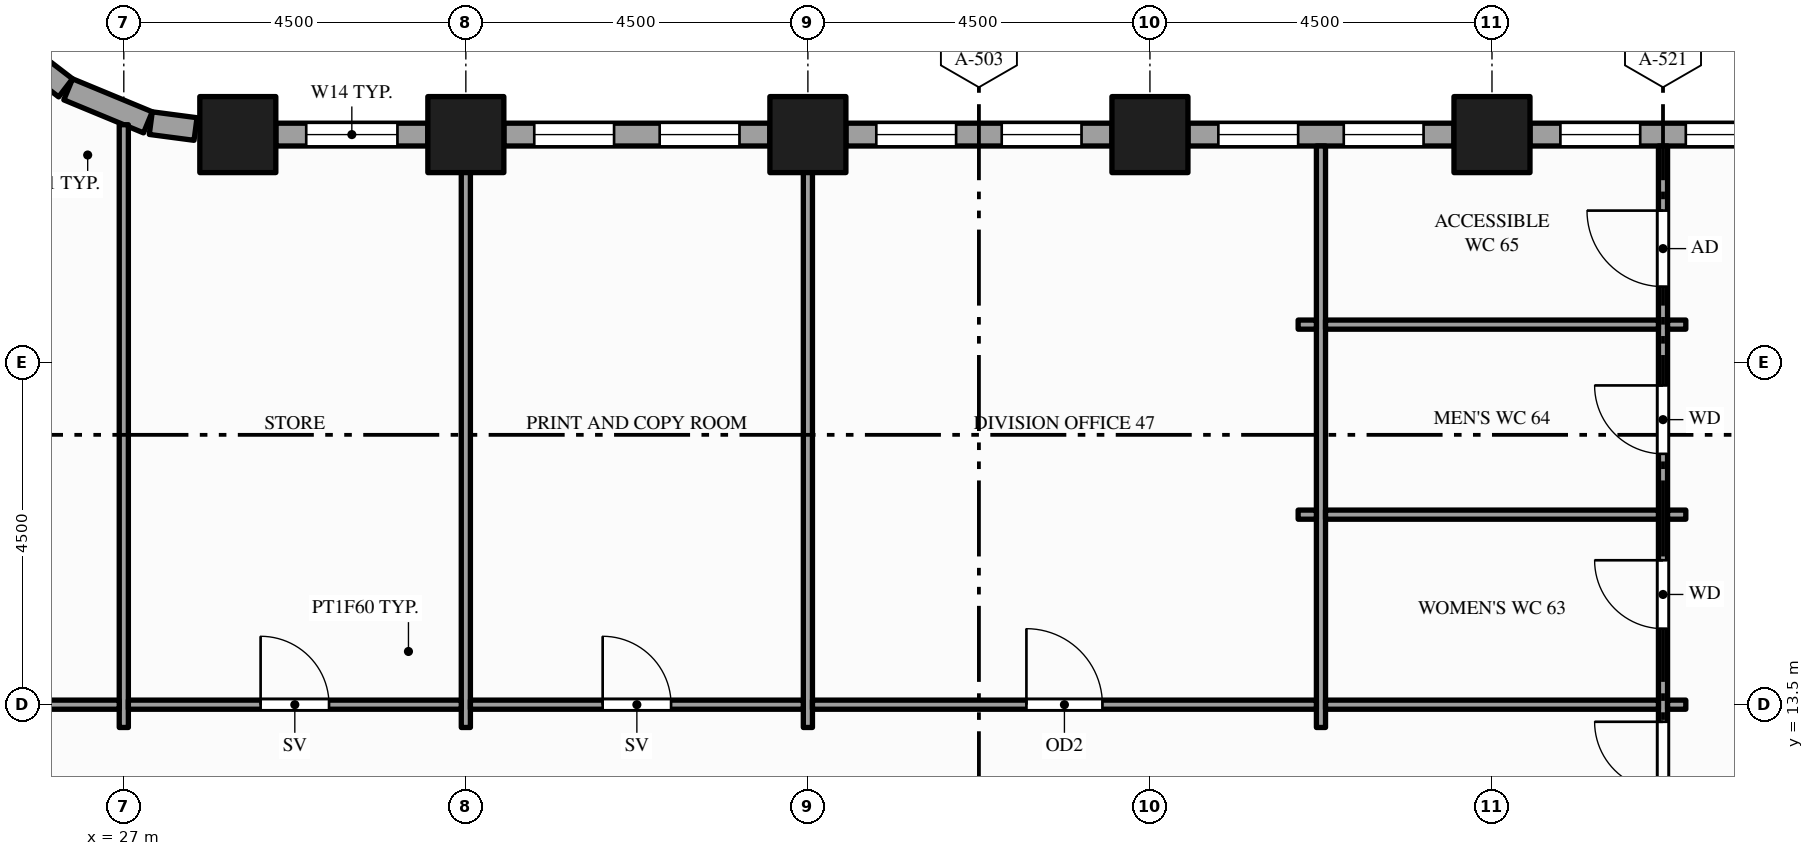
"""IFC4 building model, lengths in metres.
Left out: names, types, materials, properties, quantities, classifications, styles, units other than length and angle.
Written with IfcOpenShell. Run it as: python <this file> out.ifc"""

import sys

from ifc_helpers import new_model, si_unit, direction, frame, frame_2d, origin, origin_2d, place, context, subcontext, project, spatial, rectangle, hollow_rectangle, extrude, element, fill, save


model = new_model("IFC4")
c1 = context("Model", 3, precision=1e-05, world=origin(), true_north=direction((0.0, 1.0)))
c2 = subcontext(c1, "Body", "Model", "MODEL_VIEW")
j1 = project(units=[si_unit("LENGTHUNIT", "METRE"), si_unit("PLANEANGLEUNIT", "RADIAN")], contexts=[c1])
p1 = place(None, origin())
s1 = spatial("IfcSite", under=j1, at=p1, CompositionType="ELEMENT")
p2 = place(p1, origin())
s2 = spatial("IfcBuilding", under=s1, at=p2, CompositionType="ELEMENT")
p3 = place(p2, frame((0.0, 0.0, 123.0)))
s3 = spatial("IfcBuildingStorey", under=s2, at=p3, CompositionType="ELEMENT", Elevation=123.0)
for number, where, z_axis, x_axis in (
    (1, (28.5, 21.0, -0.15), (0.0, 0.0, 1.0), (1.0, 0.0, 0.0)),
    (2, (31.5, 21.0, -0.15), (0.0, 0.0, 1.0), (1.0, 0.0, 0.0)),
    (3, (36.0, 21.0, -0.15), (0.0, 0.0, 1.0), (1.0, 0.0, 0.0)),
    (4, (40.5, 21.0, -0.15), (0.0, 0.0, 1.0), (1.0, 0.0, 0.0)),
    (5, (45.0, 21.0, -0.15), (0.0, 0.0, 1.0), (1.0, 0.0, 0.0)),
):
    element("IfcColumn", number, at=place(p3, frame(where, z_axis=z_axis, x_axis=x_axis)), inside=s3, PredefinedType="COLUMN", context=c2, shape_type="SweptSolid", body=[
        extrude(hollow_rectangle(XDim=1.0, YDim=1.0, WallThickness=0.05, at=origin_2d()), origin(), (0.0, 0.0, 1.0), 4.0),
    ])
p4 = place(p3, frame((49.0, 21.0, 0.0), z_axis=(0.0, 0.0, 1.0), x_axis=(-1.0, 0.0, 0.0)))
e6 = element("IfcWall", 6, at=p4, inside=s3, PredefinedType="STANDARD", context=c2, shape_type="SweptSolid", body=[
    extrude(rectangle(XDim=3.5, YDim=0.3, at=frame_2d((1.75, 0.0))), origin(), (0.0, 0.0, 1.0), 3.154),
])
p5 = place(p4, frame((0.4, 0.0, 0.9)))
e7 = element("IfcOpeningElement", 7, at=p5, cuts=e6, PredefinedType="OPENING", context=c2, shape_type="SweptSolid", body=[
    extrude(rectangle(XDim=1.05, YDim=2.0, at=frame_2d((0.525, 1.0))), frame((0.0, 0.16, 0.0), z_axis=(0.0, -1.0, 0.0), x_axis=(1.0, 0.0, 0.0)), (0.0, 0.0, 1.0), 0.32),
])
p6 = place(p4, frame((2.05, 0.0, 0.9)))
e8 = element("IfcOpeningElement", 8, at=p6, cuts=e6, PredefinedType="OPENING", context=c2, shape_type="SweptSolid", body=[
    extrude(rectangle(XDim=1.05, YDim=2.0, at=frame_2d((0.525, 1.0))), frame((0.0, 0.16, 0.0), z_axis=(0.0, -1.0, 0.0), x_axis=(1.0, 0.0, 0.0)), (0.0, 0.0, 1.0), 0.32),
])
p7 = place(p3, frame((44.5, 21.0, 0.0), z_axis=(0.0, 0.0, 1.0), x_axis=(-1.0, 0.0, 0.0)))
e9 = element("IfcWall", 9, at=p7, inside=s3, PredefinedType="STANDARD", context=c2, shape_type="SweptSolid", body=[
    extrude(rectangle(XDim=3.5, YDim=0.3, at=frame_2d((1.75, 0.0))), origin(), (0.0, 0.0, 1.0), 3.154),
])
p8 = place(p7, frame((0.4, 0.0, 0.9)))
e10 = element("IfcOpeningElement", 10, at=p8, cuts=e9, PredefinedType="OPENING", context=c2, shape_type="SweptSolid", body=[
    extrude(rectangle(XDim=1.05, YDim=2.0, at=frame_2d((0.525, 1.0))), frame((0.0, 0.16, 0.0), z_axis=(0.0, -1.0, 0.0), x_axis=(1.0, 0.0, 0.0)), (0.0, 0.0, 1.0), 0.32),
])
p9 = place(p7, frame((2.05, 0.0, 0.9)))
e11 = element("IfcOpeningElement", 11, at=p9, cuts=e9, PredefinedType="OPENING", context=c2, shape_type="SweptSolid", body=[
    extrude(rectangle(XDim=1.05, YDim=2.0, at=frame_2d((0.525, 1.0))), frame((0.0, 0.16, 0.0), z_axis=(0.0, -1.0, 0.0), x_axis=(1.0, 0.0, 0.0)), (0.0, 0.0, 1.0), 0.32),
])
p10 = place(p3, frame((40.0, 21.0, 0.0), z_axis=(0.0, 0.0, 1.0), x_axis=(-1.0, 0.0, 0.0)))
e12 = element("IfcWall", 12, at=p10, inside=s3, PredefinedType="STANDARD", context=c2, shape_type="SweptSolid", body=[
    extrude(rectangle(XDim=3.5, YDim=0.3, at=frame_2d((1.75, 0.0))), origin(), (0.0, 0.0, 1.0), 3.154),
])
p11 = place(p10, frame((0.4, 0.0, 0.9)))
e13 = element("IfcOpeningElement", 13, at=p11, cuts=e12, PredefinedType="OPENING", context=c2, shape_type="SweptSolid", body=[
    extrude(rectangle(XDim=1.05, YDim=2.0, at=frame_2d((0.525, 1.0))), frame((0.0, 0.16, 0.0), z_axis=(0.0, -1.0, 0.0), x_axis=(1.0, 0.0, 0.0)), (0.0, 0.0, 1.0), 0.32),
])
p12 = place(p10, frame((2.05, 0.0, 0.9)))
e14 = element("IfcOpeningElement", 14, at=p12, cuts=e12, PredefinedType="OPENING", context=c2, shape_type="SweptSolid", body=[
    extrude(rectangle(XDim=1.05, YDim=2.0, at=frame_2d((0.525, 1.0))), frame((0.0, 0.16, 0.0), z_axis=(0.0, -1.0, 0.0), x_axis=(1.0, 0.0, 0.0)), (0.0, 0.0, 1.0), 0.32),
])
p13 = place(p3, frame((35.5, 21.0, 0.0), z_axis=(0.0, 0.0, 1.0), x_axis=(-1.0, 0.0, 0.0)))
e15 = element("IfcWall", 15, at=p13, inside=s3, PredefinedType="STANDARD", context=c2, shape_type="SweptSolid", body=[
    extrude(rectangle(XDim=3.5, YDim=0.3, at=frame_2d((1.75, 0.0))), origin(), (0.0, 0.0, 1.0), 3.154),
])
p14 = place(p13, frame((0.4, 0.0, 0.9)))
e16 = element("IfcOpeningElement", 16, at=p14, cuts=e15, PredefinedType="OPENING", context=c2, shape_type="SweptSolid", body=[
    extrude(rectangle(XDim=1.05, YDim=2.0, at=frame_2d((0.525, 1.0))), frame((0.0, 0.16, 0.0), z_axis=(0.0, -1.0, 0.0), x_axis=(1.0, 0.0, 0.0)), (0.0, 0.0, 1.0), 0.32),
])
p15 = place(p13, frame((2.05, 0.0, 0.9)))
e17 = element("IfcOpeningElement", 17, at=p15, cuts=e15, PredefinedType="OPENING", context=c2, shape_type="SweptSolid", body=[
    extrude(rectangle(XDim=1.05, YDim=2.0, at=frame_2d((0.525, 1.0))), frame((0.0, 0.16, 0.0), z_axis=(0.0, -1.0, 0.0), x_axis=(1.0, 0.0, 0.0)), (0.0, 0.0, 1.0), 0.32),
])
p16 = place(p3, frame((31.0, 21.0, 0.0), z_axis=(0.0, 0.0, 1.0), x_axis=(-1.0, 0.0, 0.0)))
e18 = element("IfcWall", 18, at=p16, inside=s3, PredefinedType="STANDARD", context=c2, shape_type="SweptSolid", body=[
    extrude(rectangle(XDim=2.0, YDim=0.3, at=frame_2d((1.0, 0.0))), origin(), (0.0, 0.0, 1.0), 3.154),
])
p17 = place(p16, frame((0.4, 0.0, 0.9)))
e19 = element("IfcOpeningElement", 19, at=p17, cuts=e18, PredefinedType="OPENING", context=c2, shape_type="SweptSolid", body=[
    extrude(rectangle(XDim=1.2, YDim=2.0, at=frame_2d((0.6, 1.0))), frame((0.0, 0.16, 0.0), z_axis=(0.0, -1.0, 0.0), x_axis=(1.0, 0.0, 0.0)), (0.0, 0.0, 1.0), 0.32),
])
p18 = place(p3, frame((27.944, 21.073, 0.0), z_axis=(0.0, 0.0, 1.0), x_axis=(-0.991420685839, 0.130709692412, 0.0)))
e20 = element("IfcWall", 20, at=p18, inside=s3, PredefinedType="STANDARD", context=c2, shape_type="SweptSolid", body=[
    extrude(rectangle(XDim=0.594, YDim=0.3, at=frame_2d((0.297, 0.0))), origin(), (0.0, 0.0, 1.0), 3.154),
])
p19 = place(p3, frame((27.317, 21.161, 0.0), z_axis=(0.0, 0.0, 1.0), x_axis=(-0.923914616768, 0.382598720491, 0.0)))
e21 = element("IfcWall", 21, at=p19, inside=s3, PredefinedType="STANDARD", context=c2, shape_type="SweptSolid", body=[
    extrude(rectangle(XDim=1.135, YDim=0.3, at=frame_2d((0.568, 0.0))), origin(), (0.0, 0.0, 1.0), 2.938),
])
p20 = place(p3, frame((26.234, 21.615, 0.0), z_axis=(0.0, 0.0, 1.0), x_axis=(-0.793563062559, 0.608488016104, 0.0)))
e22 = element("IfcWall", 22, at=p20, inside=s3, PredefinedType="STANDARD", context=c2, shape_type="SweptSolid", body=[
    extrude(rectangle(XDim=0.454, YDim=0.3, at=frame_2d((0.227, 0.0))), origin(), (0.0, 0.0, 1.0), 3.154),
])
p21 = place(p3, frame((27.0, 13.2, 0.0), z_axis=(0.0, 0.0, 1.0), x_axis=(0.0, 1.0, 0.0)))
e23 = element("IfcWall", 23, at=p21, inside=s3, PredefinedType="PARTITIONING", context=c2, shape_type="SweptSolid", body=[
    extrude(rectangle(XDim=7.93, YDim=0.12, at=frame_2d((3.965, 0.0))), origin(), (0.0, 0.0, 1.0), 2.938),
])
for number, where, z_axis, x_axis in (
    (24, (31.5, 13.2, 0.0), (0.0, 0.0, 1.0), (0.0, 1.0, 0.0)),
    (25, (36.0, 13.2, 0.0), (0.0, 0.0, 1.0), (0.0, 1.0, 0.0)),
    (26, (42.75, 13.2, 0.0), (0.0, 0.0, 1.0), (0.0, 1.0, 0.0)),
):
    element("IfcWall", number, at=place(p3, frame(where, z_axis=z_axis, x_axis=x_axis)), inside=s3, PredefinedType="PARTITIONING", context=c2, shape_type="SweptSolid", body=[
        extrude(rectangle(XDim=7.65, YDim=0.12, at=frame_2d((3.825, 0.0))), origin(), (0.0, 0.0, 1.0), 2.938),
    ])
p22 = place(p3, frame((47.25, -1.35, 0.0), z_axis=(0.0, 0.0, 1.0), x_axis=(0.0, 1.0, 0.0)))
e27 = element("IfcWall", 27, at=p22, inside=s3, PredefinedType="PARTITIONING", context=c2, shape_type="SweptSolid", body=[
    extrude(rectangle(XDim=22.2, YDim=0.12, at=frame_2d((11.1, 0.0))), origin(), (0.0, 0.0, 1.0), 2.938),
])
p23 = place(p22, frame((12.825, 0.0, 0.0)))
e28 = element("IfcOpeningElement", 28, at=p23, cuts=e27, PredefinedType="OPENING", context=c2, shape_type="SweptSolid", body=[
    extrude(rectangle(XDim=1.8, YDim=2.1, at=frame_2d((0.9, 1.05))), frame((0.0, 0.07, 0.0), z_axis=(0.0, -1.0, 0.0), x_axis=(1.0, 0.0, 0.0)), (0.0, 0.0, 1.0), 0.14),
])
p24 = place(p22, frame((15.85, 0.0, 0.0)))
e29 = element("IfcOpeningElement", 29, at=p24, cuts=e27, PredefinedType="OPENING", context=c2, shape_type="SweptSolid", body=[
    extrude(rectangle(XDim=0.9, YDim=2.1, at=frame_2d((0.45, 1.05))), frame((0.0, 0.07, 0.0), z_axis=(0.0, -1.0, 0.0), x_axis=(1.0, 0.0, 0.0)), (0.0, 0.0, 1.0), 0.14),
])
p25 = place(p22, frame((18.15, 0.0, 0.0)))
e30 = element("IfcOpeningElement", 30, at=p25, cuts=e27, PredefinedType="OPENING", context=c2, shape_type="SweptSolid", body=[
    extrude(rectangle(XDim=0.9, YDim=2.1, at=frame_2d((0.45, 1.05))), frame((0.0, 0.07, 0.0), z_axis=(0.0, -1.0, 0.0), x_axis=(1.0, 0.0, 0.0)), (0.0, 0.0, 1.0), 0.14),
])
p26 = place(p22, frame((20.35, 0.0, 0.0)))
e31 = element("IfcOpeningElement", 31, at=p26, cuts=e27, PredefinedType="OPENING", context=c2, shape_type="SweptSolid", body=[
    extrude(rectangle(XDim=1.0, YDim=2.1, at=frame_2d((0.5, 1.05))), frame((0.0, 0.07, 0.0), z_axis=(0.0, -1.0, 0.0), x_axis=(1.0, 0.0, 0.0)), (0.0, 0.0, 1.0), 0.14),
])
p27 = place(p3, frame((11.31, 13.5, 0.0), z_axis=(0.0, 0.0, 1.0), x_axis=(1.0, 0.0, 0.0)))
e32 = element("IfcWall", 32, at=p27, inside=s3, PredefinedType="PARTITIONING", context=c2, shape_type="SweptSolid", body=[
    extrude(rectangle(XDim=15.63, YDim=0.12, at=frame_2d((7.815, 0.0))), origin(), (0.0, 0.0, 1.0), 2.76),
])
p28 = place(p27, frame((3.54, 0.0, 0.0)))
e33 = element("IfcOpeningElement", 33, at=p28, cuts=e32, PredefinedType="OPENING", context=c2, shape_type="SweptSolid", body=[
    extrude(rectangle(XDim=1.8, YDim=2.1, at=frame_2d((0.9, 1.05))), frame((0.0, 0.07, 0.0), z_axis=(0.0, -1.0, 0.0), x_axis=(1.0, 0.0, 0.0)), (0.0, 0.0, 1.0), 0.14),
])
p29 = place(p3, frame((27.06, 13.5, 0.0), z_axis=(0.0, 0.0, 1.0), x_axis=(1.0, 0.0, 0.0)))
e34 = element("IfcWall", 34, at=p29, inside=s3, PredefinedType="PARTITIONING", context=c2, shape_type="SweptSolid", body=[
    extrude(rectangle(XDim=4.38, YDim=0.12, at=frame_2d((2.19, 0.0))), origin(), (0.0, 0.0, 1.0), 2.938),
])
p30 = place(p29, frame((1.74, 0.0, 0.0)))
e35 = element("IfcOpeningElement", 35, at=p30, cuts=e34, PredefinedType="OPENING", context=c2, shape_type="SweptSolid", body=[
    extrude(rectangle(XDim=0.9, YDim=2.1, at=frame_2d((0.45, 1.05))), frame((0.0, 0.07, 0.0), z_axis=(0.0, -1.0, 0.0), x_axis=(1.0, 0.0, 0.0)), (0.0, 0.0, 1.0), 0.14),
])
p31 = place(p3, frame((31.56, 13.5, 0.0), z_axis=(0.0, 0.0, 1.0), x_axis=(1.0, 0.0, 0.0)))
e36 = element("IfcWall", 36, at=p31, inside=s3, PredefinedType="PARTITIONING", context=c2, shape_type="SweptSolid", body=[
    extrude(rectangle(XDim=4.38, YDim=0.12, at=frame_2d((2.19, 0.0))), origin(), (0.0, 0.0, 1.0), 2.938),
])
p32 = place(p31, frame((1.74, 0.0, 0.0)))
e37 = element("IfcOpeningElement", 37, at=p32, cuts=e36, PredefinedType="OPENING", context=c2, shape_type="SweptSolid", body=[
    extrude(rectangle(XDim=0.9, YDim=2.1, at=frame_2d((0.45, 1.05))), frame((0.0, 0.07, 0.0), z_axis=(0.0, -1.0, 0.0), x_axis=(1.0, 0.0, 0.0)), (0.0, 0.0, 1.0), 0.14),
])
p33 = place(p3, frame((36.06, 13.5, 0.0), z_axis=(0.0, 0.0, 1.0), x_axis=(1.0, 0.0, 0.0)))
e38 = element("IfcWall", 38, at=p33, inside=s3, PredefinedType="PARTITIONING", context=c2, shape_type="SweptSolid", body=[
    extrude(rectangle(XDim=6.63, YDim=0.12, at=frame_2d((3.315, 0.0))), origin(), (0.0, 0.0, 1.0), 2.938),
])
p34 = place(p33, frame((2.815, 0.0, 0.0)))
e39 = element("IfcOpeningElement", 39, at=p34, cuts=e38, PredefinedType="OPENING", context=c2, shape_type="SweptSolid", body=[
    extrude(rectangle(XDim=1.0, YDim=2.1, at=frame_2d((0.5, 1.05))), frame((0.0, 0.07, 0.0), z_axis=(0.0, -1.0, 0.0), x_axis=(1.0, 0.0, 0.0)), (0.0, 0.0, 1.0), 0.14),
])
p35 = place(p3, frame((42.81, 13.5, 0.0), z_axis=(0.0, 0.0, 1.0), x_axis=(1.0, 0.0, 0.0)))
e40 = element("IfcWall", 40, at=p35, inside=s3, PredefinedType="PARTITIONING", context=c2, shape_type="SweptSolid", body=[
    extrude(rectangle(XDim=4.38, YDim=0.12, at=frame_2d((2.19, 0.0))), origin(), (0.0, 0.0, 1.0), 2.938),
])
for number, where, z_axis, x_axis in (
    (41, (47.31, 13.5, 0.0), (0.0, 0.0, 1.0), (1.0, 0.0, 0.0)),
    (42, (42.45, 16.0, 0.0), (0.0, 0.0, 1.0), (1.0, 0.0, 0.0)),
):
    element("IfcWall", number, at=place(p3, frame(where, z_axis=z_axis, x_axis=x_axis)), inside=s3, PredefinedType="PARTITIONING", context=c2, shape_type="SweptSolid", body=[
        extrude(rectangle(XDim=0.24, YDim=0.12, at=frame_2d((0.12, 0.0))), origin(), (0.0, 0.0, 1.0), 2.938),
    ])
p36 = place(p3, frame((42.81, 16.0, 0.0), z_axis=(0.0, 0.0, 1.0), x_axis=(1.0, 0.0, 0.0)))
e43 = element("IfcWall", 43, at=p36, inside=s3, PredefinedType="PARTITIONING", context=c2, shape_type="SweptSolid", body=[
    extrude(rectangle(XDim=4.38, YDim=0.12, at=frame_2d((2.19, 0.0))), origin(), (0.0, 0.0, 1.0), 2.938),
])
for number, where, z_axis, x_axis in (
    (44, (47.31, 16.0, 0.0), (0.0, 0.0, 1.0), (1.0, 0.0, 0.0)),
    (45, (42.45, 18.5, 0.0), (0.0, 0.0, 1.0), (1.0, 0.0, 0.0)),
):
    element("IfcWall", number, at=place(p3, frame(where, z_axis=z_axis, x_axis=x_axis)), inside=s3, PredefinedType="PARTITIONING", context=c2, shape_type="SweptSolid", body=[
        extrude(rectangle(XDim=0.24, YDim=0.12, at=frame_2d((0.12, 0.0))), origin(), (0.0, 0.0, 1.0), 2.938),
    ])
p37 = place(p3, frame((42.81, 18.5, 0.0), z_axis=(0.0, 0.0, 1.0), x_axis=(1.0, 0.0, 0.0)))
e46 = element("IfcWall", 46, at=p37, inside=s3, PredefinedType="PARTITIONING", context=c2, shape_type="SweptSolid", body=[
    extrude(rectangle(XDim=4.38, YDim=0.12, at=frame_2d((2.19, 0.0))), origin(), (0.0, 0.0, 1.0), 2.938),
])
p38 = place(p3, frame((47.31, 18.5, 0.0), z_axis=(0.0, 0.0, 1.0), x_axis=(1.0, 0.0, 0.0)))
e47 = element("IfcWall", 47, at=p38, inside=s3, PredefinedType="PARTITIONING", context=c2, shape_type="SweptSolid", body=[
    extrude(rectangle(XDim=0.24, YDim=0.12, at=frame_2d((0.12, 0.0))), origin(), (0.0, 0.0, 1.0), 2.938),
])
p39 = place(p5, origin())
e48 = element("IfcWindow", 48, at=p39, inside=s3, PartitioningType="SINGLE_PANEL", PredefinedType="WINDOW", context=c2, shape_type="SweptSolid", body=[
    extrude(rectangle(XDim=1.05, YDim=2.0, at=frame_2d((0.525, 1.0))), frame((0.0, 0.03, 0.0), z_axis=(0.0, -1.0, 0.0), x_axis=(1.0, 0.0, 0.0)), (0.0, 0.0, 1.0), 0.06),
])
fill(e7, e48)
p40 = place(p6, origin())
e49 = element("IfcWindow", 49, at=p40, inside=s3, PartitioningType="SINGLE_PANEL", PredefinedType="WINDOW", context=c2, shape_type="SweptSolid", body=[
    extrude(rectangle(XDim=1.05, YDim=2.0, at=frame_2d((0.525, 1.0))), frame((0.0, 0.03, 0.0), z_axis=(0.0, -1.0, 0.0), x_axis=(1.0, 0.0, 0.0)), (0.0, 0.0, 1.0), 0.06),
])
fill(e8, e49)
p41 = place(p8, origin())
e50 = element("IfcWindow", 50, at=p41, inside=s3, PartitioningType="SINGLE_PANEL", PredefinedType="WINDOW", context=c2, shape_type="SweptSolid", body=[
    extrude(rectangle(XDim=1.05, YDim=2.0, at=frame_2d((0.525, 1.0))), frame((0.0, 0.03, 0.0), z_axis=(0.0, -1.0, 0.0), x_axis=(1.0, 0.0, 0.0)), (0.0, 0.0, 1.0), 0.06),
])
fill(e10, e50)
p42 = place(p9, origin())
e51 = element("IfcWindow", 51, at=p42, inside=s3, PartitioningType="SINGLE_PANEL", PredefinedType="WINDOW", context=c2, shape_type="SweptSolid", body=[
    extrude(rectangle(XDim=1.05, YDim=2.0, at=frame_2d((0.525, 1.0))), frame((0.0, 0.03, 0.0), z_axis=(0.0, -1.0, 0.0), x_axis=(1.0, 0.0, 0.0)), (0.0, 0.0, 1.0), 0.06),
])
fill(e11, e51)
p43 = place(p11, origin())
e52 = element("IfcWindow", 52, at=p43, inside=s3, PartitioningType="SINGLE_PANEL", PredefinedType="WINDOW", context=c2, shape_type="SweptSolid", body=[
    extrude(rectangle(XDim=1.05, YDim=2.0, at=frame_2d((0.525, 1.0))), frame((0.0, 0.03, 0.0), z_axis=(0.0, -1.0, 0.0), x_axis=(1.0, 0.0, 0.0)), (0.0, 0.0, 1.0), 0.06),
])
fill(e13, e52)
p44 = place(p12, origin())
e53 = element("IfcWindow", 53, at=p44, inside=s3, PartitioningType="SINGLE_PANEL", PredefinedType="WINDOW", context=c2, shape_type="SweptSolid", body=[
    extrude(rectangle(XDim=1.05, YDim=2.0, at=frame_2d((0.525, 1.0))), frame((0.0, 0.03, 0.0), z_axis=(0.0, -1.0, 0.0), x_axis=(1.0, 0.0, 0.0)), (0.0, 0.0, 1.0), 0.06),
])
fill(e14, e53)
p45 = place(p14, origin())
e54 = element("IfcWindow", 54, at=p45, inside=s3, PartitioningType="SINGLE_PANEL", PredefinedType="WINDOW", context=c2, shape_type="SweptSolid", body=[
    extrude(rectangle(XDim=1.05, YDim=2.0, at=frame_2d((0.525, 1.0))), frame((0.0, 0.03, 0.0), z_axis=(0.0, -1.0, 0.0), x_axis=(1.0, 0.0, 0.0)), (0.0, 0.0, 1.0), 0.06),
])
fill(e16, e54)
p46 = place(p15, origin())
e55 = element("IfcWindow", 55, at=p46, inside=s3, PartitioningType="SINGLE_PANEL", PredefinedType="WINDOW", context=c2, shape_type="SweptSolid", body=[
    extrude(rectangle(XDim=1.05, YDim=2.0, at=frame_2d((0.525, 1.0))), frame((0.0, 0.03, 0.0), z_axis=(0.0, -1.0, 0.0), x_axis=(1.0, 0.0, 0.0)), (0.0, 0.0, 1.0), 0.06),
])
fill(e17, e55)
p47 = place(p17, origin())
e56 = element("IfcWindow", 56, at=p47, inside=s3, PartitioningType="SINGLE_PANEL", PredefinedType="WINDOW", context=c2, shape_type="SweptSolid", body=[
    extrude(rectangle(XDim=1.2, YDim=2.0, at=frame_2d((0.6, 1.0))), frame((0.0, 0.03, 0.0), z_axis=(0.0, -1.0, 0.0), x_axis=(1.0, 0.0, 0.0)), (0.0, 0.0, 1.0), 0.06),
])
fill(e19, e56)
p48 = place(p23, origin())
e57 = element("IfcDoor", 57, at=p48, inside=s3, OperationType="DOUBLE_DOOR_SINGLE_SWING", PredefinedType="DOOR", context=c2, shape_type="SweptSolid", body=[
    extrude(rectangle(XDim=1.8, YDim=2.1, at=frame_2d((0.9, 1.05))), frame((0.0, 0.025, 0.0), z_axis=(0.0, -1.0, 0.0), x_axis=(1.0, 0.0, 0.0)), (0.0, 0.0, 1.0), 0.05),
])
fill(e28, e57)
p49 = place(p30, origin())
e58 = element("IfcDoor", 58, at=p49, inside=s3, OperationType="SINGLE_SWING_LEFT", PredefinedType="DOOR", context=c2, shape_type="SweptSolid", body=[
    extrude(rectangle(XDim=0.9, YDim=2.1, at=frame_2d((0.45, 1.05))), frame((0.0, 0.025, 0.0), z_axis=(0.0, -1.0, 0.0), x_axis=(1.0, 0.0, 0.0)), (0.0, 0.0, 1.0), 0.05),
])
fill(e35, e58)
p50 = place(p32, origin())
e59 = element("IfcDoor", 59, at=p50, inside=s3, OperationType="SINGLE_SWING_LEFT", PredefinedType="DOOR", context=c2, shape_type="SweptSolid", body=[
    extrude(rectangle(XDim=0.9, YDim=2.1, at=frame_2d((0.45, 1.05))), frame((0.0, 0.025, 0.0), z_axis=(0.0, -1.0, 0.0), x_axis=(1.0, 0.0, 0.0)), (0.0, 0.0, 1.0), 0.05),
])
fill(e37, e59)
p51 = place(p34, origin())
e60 = element("IfcDoor", 60, at=p51, inside=s3, OperationType="SINGLE_SWING_LEFT", PredefinedType="DOOR", context=c2, shape_type="SweptSolid", body=[
    extrude(rectangle(XDim=1.0, YDim=2.1, at=frame_2d((0.5, 1.05))), frame((0.0, 0.025, 0.0), z_axis=(0.0, -1.0, 0.0), x_axis=(1.0, 0.0, 0.0)), (0.0, 0.0, 1.0), 0.05),
])
fill(e39, e60)
p52 = place(p24, origin())
e61 = element("IfcDoor", 61, at=p52, inside=s3, OperationType="SINGLE_SWING_RIGHT", PredefinedType="DOOR", context=c2, shape_type="SweptSolid", body=[
    extrude(rectangle(XDim=0.9, YDim=2.1, at=frame_2d((0.45, 1.05))), frame((0.0, 0.025, 0.0), z_axis=(0.0, -1.0, 0.0), x_axis=(1.0, 0.0, 0.0)), (0.0, 0.0, 1.0), 0.05),
])
fill(e29, e61)
p53 = place(p25, origin())
e62 = element("IfcDoor", 62, at=p53, inside=s3, OperationType="SINGLE_SWING_RIGHT", PredefinedType="DOOR", context=c2, shape_type="SweptSolid", body=[
    extrude(rectangle(XDim=0.9, YDim=2.1, at=frame_2d((0.45, 1.05))), frame((0.0, 0.025, 0.0), z_axis=(0.0, -1.0, 0.0), x_axis=(1.0, 0.0, 0.0)), (0.0, 0.0, 1.0), 0.05),
])
fill(e30, e62)
p54 = place(p26, origin())
e63 = element("IfcDoor", 63, at=p54, inside=s3, OperationType="SINGLE_SWING_RIGHT", PredefinedType="DOOR", context=c2, shape_type="SweptSolid", body=[
    extrude(rectangle(XDim=1.0, YDim=2.1, at=frame_2d((0.5, 1.05))), frame((0.0, 0.025, 0.0), z_axis=(0.0, -1.0, 0.0), x_axis=(1.0, 0.0, 0.0)), (0.0, 0.0, 1.0), 0.05),
])
fill(e31, e63)
save(model, sys.argv[1])
